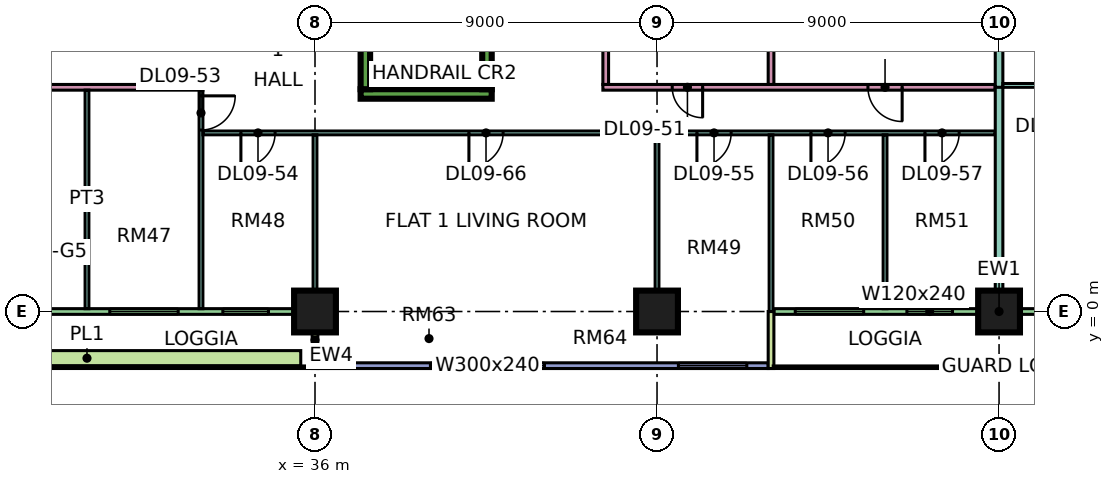
"""IFC4 building model, lengths in metres.
Left out: names, types, materials, properties, quantities, classifications, styles, units other than length and angle.
Written with IfcOpenShell. Run it as: python <this file> out.ifc"""

import sys

from ifc_helpers import new_model, si_unit, direction, frame, frame_2d, origin, origin_2d, place, context, subcontext, project, spatial, rectangle, extrude, element, fill, save


model = new_model("IFC4")
c1 = context("Model", 3, precision=1e-05, world=origin(), true_north=direction((0.0, 1.0)))
c2 = subcontext(c1, "Body", "Model", "MODEL_VIEW")
j1 = project(units=[si_unit("LENGTHUNIT", "METRE"), si_unit("PLANEANGLEUNIT", "RADIAN")], contexts=[c1])
p1 = place(None, origin())
s1 = spatial("IfcSite", under=j1, at=p1, CompositionType="ELEMENT")
p2 = place(p1, origin())
s2 = spatial("IfcBuilding", under=s1, at=p2, CompositionType="ELEMENT")
p3 = place(p2, frame((0.0, 0.0, 48.9)))
s3 = spatial("IfcBuildingStorey", under=s2, at=p3, CompositionType="ELEMENT", Elevation=48.9)
for number, where, z_axis, x_axis in (
    (1, (36.0, 0.0, 0.0), (0.0, 0.0, 1.0), (1.0, 0.0, 0.0)),
    (2, (45.0, 0.0, 0.0), (0.0, 0.0, 1.0), (1.0, 0.0, 0.0)),
    (3, (54.0, 0.0, 0.0), (0.0, 0.0, 1.0), (1.0, 0.0, 0.0)),
):
    element("IfcColumn", number, at=place(p3, frame(where, z_axis=z_axis, x_axis=x_axis)), inside=s3, PredefinedType="COLUMN", context=c2, shape_type="SweptSolid", body=[
        extrude(rectangle(XDim=1.1, YDim=1.1, at=origin_2d()), origin(), (0.0, 0.0, 1.0), 3.75),
    ])
p4 = place(p3, frame((37.2, 5.725, 0.0), z_axis=(0.0, 0.0, 1.0), x_axis=(1.0, 0.0, 0.0)))
e4 = element("IfcWall", 4, at=p4, inside=s3, PredefinedType="SHEAR", context=c2, shape_type="SweptSolid", body=[
    extrude(rectangle(XDim=3.45, YDim=0.25, at=frame_2d((1.725, 0.0))), origin(), (0.0, 0.0, 1.0), 3.75),
])
for number, where, z_axis, x_axis in (
    (5, (37.325, 5.85, 0.0), (0.0, 0.0, 1.0), (0.0, 1.0, 0.0)),
    (6, (40.525, 5.85, 0.0), (0.0, 0.0, 1.0), (0.0, 1.0, 0.0)),
):
    element("IfcWall", number, at=place(p3, frame(where, z_axis=z_axis, x_axis=x_axis)), inside=s3, PredefinedType="SHEAR", context=c2, shape_type="SweptSolid", body=[
        extrude(rectangle(XDim=6.5, YDim=0.25, at=frame_2d((3.25, 0.0))), origin(), (0.0, 0.0, 1.0), 3.75),
    ])
p5 = place(p3, frame((24.075, 0.0, 0.0), z_axis=(0.0, 0.0, 1.0), x_axis=(1.0, 0.0, 0.0)))
e7 = element("IfcWall", 7, at=p5, inside=s3, PredefinedType="SOLIDWALL", context=c2, shape_type="SweptSolid", body=[
    extrude(rectangle(XDim=11.85, YDim=0.15, at=frame_2d((5.925, 0.0))), origin(), (0.0, 0.0, 1.0), 3.35),
])
p6 = place(p5, frame((2.35, 0.0, 0.0)))
e8 = element("IfcOpeningElement", 8, at=p6, cuts=e7, PredefinedType="OPENING", context=c2, shape_type="SweptSolid", body=[
    extrude(rectangle(XDim=1.8, YDim=2.4, at=frame_2d((0.9, 1.2))), frame((0.0, 0.085, 0.0), z_axis=(0.0, -1.0, 0.0), x_axis=(1.0, 0.0, 0.0)), (0.0, 0.0, 1.0), 0.17),
])
p7 = place(p5, frame((6.525, 0.0, 0.45)))
e9 = element("IfcOpeningElement", 9, at=p7, cuts=e7, PredefinedType="OPENING", context=c2, shape_type="SweptSolid", body=[
    extrude(rectangle(XDim=1.8, YDim=2.4, at=frame_2d((0.9, 1.2))), frame((0.0, 0.085, 0.0), z_axis=(0.0, -1.0, 0.0), x_axis=(1.0, 0.0, 0.0)), (0.0, 0.0, 1.0), 0.17),
])
p8 = place(p5, frame((9.5, 0.0, 0.45)))
e10 = element("IfcOpeningElement", 10, at=p8, cuts=e7, PredefinedType="OPENING", context=c2, shape_type="SweptSolid", body=[
    extrude(rectangle(XDim=1.2, YDim=2.4, at=frame_2d((0.6, 1.2))), frame((0.0, 0.085, 0.0), z_axis=(0.0, -1.0, 0.0), x_axis=(1.0, 0.0, 0.0)), (0.0, 0.0, 1.0), 0.17),
])
p9 = place(p3, frame((36.0, -1.5, 0.0), z_axis=(0.0, 0.0, 1.0), x_axis=(0.0, 1.0, 0.0)))
e11 = element("IfcWall", 11, at=p9, inside=s3, PredefinedType="SOLIDWALL", context=c2, shape_type="SweptSolid", body=[
    extrude(rectangle(XDim=1.5, YDim=0.15, at=frame_2d((0.75, 0.0))), origin(), (0.0, 0.0, 1.0), 3.35),
])
p10 = place(p3, frame((36.075, -1.425, 0.0), z_axis=(0.0, 0.0, 1.0), x_axis=(1.0, 0.0, 0.0)))
e12 = element("IfcWall", 12, at=p10, inside=s3, PredefinedType="SOLIDWALL", context=c2, shape_type="SweptSolid", body=[
    extrude(rectangle(XDim=11.85, YDim=0.15, at=frame_2d((5.925, 0.0))), origin(), (0.0, 0.0, 1.0), 3.35),
])
p11 = place(p10, frame((2.962, 0.0, 0.45)))
e13 = element("IfcOpeningElement", 13, at=p11, cuts=e12, PredefinedType="OPENING", context=c2, shape_type="SweptSolid", body=[
    extrude(rectangle(XDim=3.0, YDim=2.4, at=frame_2d((1.5, 1.2))), frame((0.0, 0.085, 0.0), z_axis=(0.0, -1.0, 0.0), x_axis=(1.0, 0.0, 0.0)), (0.0, 0.0, 1.0), 0.17),
])
p12 = place(p10, frame((9.488, 0.0, 0.45)))
e14 = element("IfcOpeningElement", 14, at=p12, cuts=e12, PredefinedType="OPENING", context=c2, shape_type="SweptSolid", body=[
    extrude(rectangle(XDim=1.8, YDim=2.4, at=frame_2d((0.9, 1.2))), frame((0.0, 0.085, 0.0), z_axis=(0.0, -1.0, 0.0), x_axis=(1.0, 0.0, 0.0)), (0.0, 0.0, 1.0), 0.17),
])
p13 = place(p3, frame((48.075, 0.0, 0.0), z_axis=(0.0, 0.0, 1.0), x_axis=(1.0, 0.0, 0.0)))
e15 = element("IfcWall", 15, at=p13, inside=s3, PredefinedType="SOLIDWALL", context=c2, shape_type="SweptSolid", body=[
    extrude(rectangle(XDim=11.85, YDim=0.15, at=frame_2d((5.925, 0.0))), origin(), (0.0, 0.0, 1.0), 3.35),
])
p14 = place(p13, frame((0.562, 0.0, 0.45)))
e16 = element("IfcOpeningElement", 16, at=p14, cuts=e15, PredefinedType="OPENING", context=c2, shape_type="SweptSolid", body=[
    extrude(rectangle(XDim=1.8, YDim=2.4, at=frame_2d((0.9, 1.2))), frame((0.0, 0.085, 0.0), z_axis=(0.0, -1.0, 0.0), x_axis=(1.0, 0.0, 0.0)), (0.0, 0.0, 1.0), 0.17),
])
p15 = place(p13, frame((3.5, 0.0, 0.45)))
e17 = element("IfcOpeningElement", 17, at=p15, cuts=e15, PredefinedType="OPENING", context=c2, shape_type="SweptSolid", body=[
    extrude(rectangle(XDim=1.2, YDim=2.4, at=frame_2d((0.6, 1.2))), frame((0.0, 0.085, 0.0), z_axis=(0.0, -1.0, 0.0), x_axis=(1.0, 0.0, 0.0)), (0.0, 0.0, 1.0), 0.17),
])
p16 = place(p13, frame((7.15, 0.0, 0.45)))
e18 = element("IfcOpeningElement", 18, at=p16, cuts=e15, PredefinedType="OPENING", context=c2, shape_type="SweptSolid", body=[
    extrude(rectangle(XDim=1.2, YDim=2.4, at=frame_2d((0.6, 1.2))), frame((0.0, 0.085, 0.0), z_axis=(0.0, -1.0, 0.0), x_axis=(1.0, 0.0, 0.0)), (0.0, 0.0, 1.0), 0.17),
])
p17 = place(p13, frame((9.488, 0.0, 0.45)))
e19 = element("IfcOpeningElement", 19, at=p17, cuts=e15, PredefinedType="OPENING", context=c2, shape_type="SweptSolid", body=[
    extrude(rectangle(XDim=1.8, YDim=2.4, at=frame_2d((0.9, 1.2))), frame((0.0, 0.085, 0.0), z_axis=(0.0, -1.0, 0.0), x_axis=(1.0, 0.0, 0.0)), (0.0, 0.0, 1.0), 0.17),
])
p18 = place(p3, frame((48.0, -1.5, 0.0), z_axis=(0.0, 0.0, 1.0), x_axis=(0.0, 1.0, 0.0)))
e20 = element("IfcWall", 20, at=p18, inside=s3, PredefinedType="SOLIDWALL", context=c2, shape_type="SweptSolid", body=[
    extrude(rectangle(XDim=1.5, YDim=0.15, at=frame_2d((0.75, 0.0))), origin(), (0.0, 0.0, 1.0), 3.35),
])
p19 = place(p3, frame((24.375, -1.229, 0.0), z_axis=(0.0, 0.0, 1.0), x_axis=(1.0, 0.0, 0.0)))
e21 = element("IfcWall", 21, at=p19, inside=s3, PredefinedType="SOLIDWALL", context=c2, shape_type="SweptSolid", body=[
    extrude(rectangle(XDim=11.25, YDim=0.4, at=frame_2d((5.625, 0.0))), origin(), (0.0, 0.0, 1.0), 0.7),
])
p20 = place(p3, frame((11.925, 5.9, 0.0), z_axis=(0.0, 0.0, 1.0), x_axis=(1.0, 0.0, 0.0)))
e22 = element("IfcWall", 22, at=p20, inside=s3, PredefinedType="PARTITIONING", context=c2, shape_type="SweptSolid", body=[
    extrude(rectangle(XDim=21.125, YDim=0.15, at=frame_2d((10.562, 0.0))), origin(), (0.0, 0.0, 1.0), 3.35),
])
p21 = place(p20, frame((7.125, 0.0, 0.0)))
e23 = element("IfcOpeningElement", 23, at=p21, cuts=e22, PredefinedType="OPENING", context=c2, shape_type="SweptSolid", body=[
    extrude(rectangle(XDim=0.9, YDim=2.1, at=frame_2d((0.45, 1.05))), frame((0.0, 0.085, 0.0), z_axis=(0.0, -1.0, 0.0), x_axis=(1.0, 0.0, 0.0)), (0.0, 0.0, 1.0), 0.17),
])
p22 = place(p20, frame((4.125, 0.0, 0.0)))
e24 = element("IfcOpeningElement", 24, at=p22, cuts=e22, PredefinedType="OPENING", context=c2, shape_type="SweptSolid", body=[
    extrude(rectangle(XDim=0.9, YDim=2.1, at=frame_2d((0.45, 1.05))), frame((0.0, 0.085, 0.0), z_axis=(0.0, -1.0, 0.0), x_axis=(1.0, 0.0, 0.0)), (0.0, 0.0, 1.0), 0.17),
])
p23 = place(p20, frame((13.125, 0.0, 0.0)))
e25 = element("IfcOpeningElement", 25, at=p23, cuts=e22, PredefinedType="OPENING", context=c2, shape_type="SweptSolid", body=[
    extrude(rectangle(XDim=0.9, YDim=2.1, at=frame_2d((0.45, 1.05))), frame((0.0, 0.085, 0.0), z_axis=(0.0, -1.0, 0.0), x_axis=(1.0, 0.0, 0.0)), (0.0, 0.0, 1.0), 0.17),
])
p24 = place(p3, frame((30.0, 0.074, 0.0), z_axis=(0.0, 0.0, 1.0), x_axis=(0.0, 1.0, 0.0)))
e26 = element("IfcWall", 26, at=p24, inside=s3, PredefinedType="PARTITIONING", context=c2, shape_type="SweptSolid", body=[
    extrude(rectangle(XDim=5.751, YDim=0.1, at=frame_2d((2.875, 0.0))), origin(), (0.0, 0.0, 1.0), 3.35),
])
p25 = place(p3, frame((33.0, 0.074, 0.0), z_axis=(0.0, 0.0, 1.0), x_axis=(0.0, 1.0, 0.0)))
e27 = element("IfcWall", 27, at=p25, inside=s3, PredefinedType="PARTITIONING", context=c2, shape_type="SweptSolid", body=[
    extrude(rectangle(XDim=5.751, YDim=0.1, at=frame_2d((2.875, 0.0))), origin(), (0.0, 0.0, 1.0), 3.35),
])
p26 = place(p25, frame((4.701, 0.0, 0.0)))
e28 = element("IfcOpeningElement", 28, at=p26, cuts=e27, PredefinedType="OPENING", context=c2, shape_type="SweptSolid", body=[
    extrude(rectangle(XDim=0.9, YDim=2.1, at=frame_2d((0.45, 1.05))), frame((0.0, 0.06, 0.0), z_axis=(0.0, -1.0, 0.0), x_axis=(1.0, 0.0, 0.0)), (0.0, 0.0, 1.0), 0.12),
])
p27 = place(p3, frame((33.05, 4.7, 0.0), z_axis=(0.0, 0.0, 1.0), x_axis=(1.0, 0.0, 0.0)))
e29 = element("IfcWall", 29, at=p27, inside=s3, PredefinedType="PARTITIONING", context=c2, shape_type="SweptSolid", body=[
    extrude(rectangle(XDim=20.85, YDim=0.1, at=frame_2d((10.425, 0.0))), origin(), (0.0, 0.0, 1.0), 3.35),
])
p28 = place(p27, frame((1.0, 0.0, 0.0)))
e30 = element("IfcOpeningElement", 30, at=p28, cuts=e29, PredefinedType="OPENING", context=c2, shape_type="SweptSolid", body=[
    extrude(rectangle(XDim=0.9, YDim=2.1, at=frame_2d((0.45, 1.05))), frame((0.0, 0.06, 0.0), z_axis=(0.0, -1.0, 0.0), x_axis=(1.0, 0.0, 0.0)), (0.0, 0.0, 1.0), 0.12),
])
p29 = place(p27, frame((13.0, 0.0, 0.0)))
e31 = element("IfcOpeningElement", 31, at=p29, cuts=e29, PredefinedType="OPENING", context=c2, shape_type="SweptSolid", body=[
    extrude(rectangle(XDim=0.9, YDim=2.1, at=frame_2d((0.45, 1.05))), frame((0.0, 0.06, 0.0), z_axis=(0.0, -1.0, 0.0), x_axis=(1.0, 0.0, 0.0)), (0.0, 0.0, 1.0), 0.12),
])
p30 = place(p27, frame((16.0, 0.0, 0.0)))
e32 = element("IfcOpeningElement", 32, at=p30, cuts=e29, PredefinedType="OPENING", context=c2, shape_type="SweptSolid", body=[
    extrude(rectangle(XDim=0.9, YDim=2.1, at=frame_2d((0.45, 1.05))), frame((0.0, 0.06, 0.0), z_axis=(0.0, -1.0, 0.0), x_axis=(1.0, 0.0, 0.0)), (0.0, 0.0, 1.0), 0.12),
])
p31 = place(p27, frame((19.0, 0.0, 0.0)))
e33 = element("IfcOpeningElement", 33, at=p31, cuts=e29, PredefinedType="OPENING", context=c2, shape_type="SweptSolid", body=[
    extrude(rectangle(XDim=0.9, YDim=2.1, at=frame_2d((0.45, 1.05))), frame((0.0, 0.06, 0.0), z_axis=(0.0, -1.0, 0.0), x_axis=(1.0, 0.0, 0.0)), (0.0, 0.0, 1.0), 0.12),
])
p32 = place(p27, frame((7.0, 0.0, 0.0)))
e34 = element("IfcOpeningElement", 34, at=p32, cuts=e29, PredefinedType="OPENING", context=c2, shape_type="SweptSolid", body=[
    extrude(rectangle(XDim=0.9, YDim=2.1, at=frame_2d((0.45, 1.05))), frame((0.0, 0.06, 0.0), z_axis=(0.0, -1.0, 0.0), x_axis=(1.0, 0.0, 0.0)), (0.0, 0.0, 1.0), 0.12),
])
p33 = place(p3, frame((36.0, 0.0, 0.0), z_axis=(0.0, 0.0, 1.0), x_axis=(0.0, 1.0, 0.0)))
e35 = element("IfcWall", 35, at=p33, inside=s3, PredefinedType="PARTITIONING", context=c2, shape_type="SweptSolid", body=[
    extrude(rectangle(XDim=4.65, YDim=0.1, at=frame_2d((2.325, 0.0))), origin(), (0.0, 0.0, 1.0), 3.35),
])
p34 = place(p3, frame((43.575, 5.9, 0.0), z_axis=(0.0, 0.0, 1.0), x_axis=(1.0, 0.0, 0.0)))
e36 = element("IfcWall", 36, at=p34, inside=s3, PredefinedType="PARTITIONING", context=c2, shape_type="SweptSolid", body=[
    extrude(rectangle(XDim=10.325, YDim=0.15, at=frame_2d((5.163, 0.0))), origin(), (0.0, 0.0, 1.0), 3.35),
])
p35 = place(p34, frame((1.825, 0.0, 0.0)))
e37 = element("IfcOpeningElement", 37, at=p35, cuts=e36, PredefinedType="OPENING", context=c2, shape_type="SweptSolid", body=[
    extrude(rectangle(XDim=0.8, YDim=2.1, at=frame_2d((0.4, 1.05))), frame((0.0, 0.085, 0.0), z_axis=(0.0, -1.0, 0.0), x_axis=(1.0, 0.0, 0.0)), (0.0, 0.0, 1.0), 0.17),
])
p36 = place(p34, frame((6.975, 0.0, 0.0)))
e38 = element("IfcOpeningElement", 38, at=p36, cuts=e36, PredefinedType="OPENING", context=c2, shape_type="SweptSolid", body=[
    extrude(rectangle(XDim=0.9, YDim=2.1, at=frame_2d((0.45, 1.05))), frame((0.0, 0.085, 0.0), z_axis=(0.0, -1.0, 0.0), x_axis=(1.0, 0.0, 0.0)), (0.0, 0.0, 1.0), 0.17),
])
p37 = place(p3, frame((43.65, 5.975, 0.0), z_axis=(0.0, 0.0, 1.0), x_axis=(0.0, 1.0, 0.0)))
e39 = element("IfcWall", 39, at=p37, inside=s3, PredefinedType="PARTITIONING", context=c2, shape_type="SweptSolid", body=[
    extrude(rectangle(XDim=6.475, YDim=0.15, at=frame_2d((3.237, 0.0))), origin(), (0.0, 0.0, 1.0), 3.35),
])
p38 = place(p37, frame((4.275, 0.0, 0.0)))
e40 = element("IfcOpeningElement", 40, at=p38, cuts=e39, PredefinedType="OPENING", context=c2, shape_type="SweptSolid", body=[
    extrude(rectangle(XDim=0.9, YDim=2.1, at=frame_2d((0.45, 1.05))), frame((0.0, 0.085, 0.0), z_axis=(0.0, -1.0, 0.0), x_axis=(1.0, 0.0, 0.0)), (0.0, 0.0, 1.0), 0.17),
])
for number, where, z_axis, x_axis in (
    (41, (45.0, 0.0, 0.0), (0.0, 0.0, 1.0), (0.0, 1.0, 0.0)),
    (42, (48.0, 0.0, 0.0), (0.0, 0.0, 1.0), (0.0, 1.0, 0.0)),
):
    element("IfcWall", number, at=place(p3, frame(where, z_axis=z_axis, x_axis=x_axis)), inside=s3, PredefinedType="PARTITIONING", context=c2, shape_type="SweptSolid", body=[
        extrude(rectangle(XDim=4.65, YDim=0.1, at=frame_2d((2.325, 0.0))), origin(), (0.0, 0.0, 1.0), 3.35),
    ])
p39 = place(p3, frame((48.0, 5.975, 0.0), z_axis=(0.0, 0.0, 1.0), x_axis=(0.0, 1.0, 0.0)))
e43 = element("IfcWall", 43, at=p39, inside=s3, PredefinedType="PARTITIONING", context=c2, shape_type="SweptSolid", body=[
    extrude(rectangle(XDim=6.475, YDim=0.15, at=frame_2d((3.237, 0.0))), origin(), (0.0, 0.0, 1.0), 3.35),
])
p40 = place(p3, frame((51.0, 0.074, 0.0), z_axis=(0.0, 0.0, 1.0), x_axis=(0.0, 1.0, 0.0)))
e44 = element("IfcWall", 44, at=p40, inside=s3, PredefinedType="PARTITIONING", context=c2, shape_type="SweptSolid", body=[
    extrude(rectangle(XDim=4.576, YDim=0.1, at=frame_2d((2.288, 0.0))), origin(), (0.0, 0.0, 1.0), 3.35),
])
p41 = place(p3, frame((54.0, 0.074, 0.0), z_axis=(0.0, 0.0, 1.0), x_axis=(0.0, 1.0, 0.0)))
e45 = element("IfcWall", 45, at=p41, inside=s3, PredefinedType="PARTITIONING", context=c2, shape_type="SweptSolid", body=[
    extrude(rectangle(XDim=5.901, YDim=0.2, at=frame_2d((2.951, 0.0))), origin(), (0.0, 0.0, 1.0), 3.35),
])
p42 = place(p3, frame((54.0, 5.9, 0.0), z_axis=(0.0, 0.0, 1.0), x_axis=(0.0, 1.0, 0.0)))
e46 = element("IfcWall", 46, at=p42, inside=s3, PredefinedType="PARTITIONING", context=c2, shape_type="SweptSolid", body=[
    extrude(rectangle(XDim=6.55, YDim=0.2, at=frame_2d((3.275, 0.0))), origin(), (0.0, 0.0, 1.0), 3.35),
])
p43 = place(p3, frame((54.1, 5.95, 0.0), z_axis=(0.0, 0.0, 1.0), x_axis=(1.0, 0.0, 0.0)))
e47 = element("IfcWall", 47, at=p43, inside=s3, PredefinedType="PARTITIONING", context=c2, shape_type="SweptSolid", body=[
    extrude(rectangle(XDim=2.85, YDim=0.1, at=frame_2d((1.425, 0.0))), origin(), (0.0, 0.0, 1.0), 3.35),
])
p44 = place(p43, frame((0.95, 0.0, 0.0)))
e48 = element("IfcOpeningElement", 48, at=p44, cuts=e47, PredefinedType="OPENING", context=c2, shape_type="SweptSolid", body=[
    extrude(rectangle(XDim=0.9, YDim=2.1, at=frame_2d((0.45, 1.05))), frame((0.0, 0.06, 0.0), z_axis=(0.0, -1.0, 0.0), x_axis=(1.0, 0.0, 0.0)), (0.0, 0.0, 1.0), 0.12),
])
p45 = place(p7, origin())
e49 = element("IfcWindow", 49, at=p45, inside=s3, PartitioningType="SINGLE_PANEL", PredefinedType="WINDOW", context=c2, shape_type="SweptSolid", body=[
    extrude(rectangle(XDim=1.8, YDim=2.4, at=frame_2d((0.9, 1.2))), frame((0.0, 0.03, 0.0), z_axis=(0.0, -1.0, 0.0), x_axis=(1.0, 0.0, 0.0)), (0.0, 0.0, 1.0), 0.06),
])
fill(e9, e49)
p46 = place(p8, origin())
e50 = element("IfcWindow", 50, at=p46, inside=s3, PartitioningType="SINGLE_PANEL", PredefinedType="WINDOW", context=c2, shape_type="SweptSolid", body=[
    extrude(rectangle(XDim=1.2, YDim=2.4, at=frame_2d((0.6, 1.2))), frame((0.0, 0.03, 0.0), z_axis=(0.0, -1.0, 0.0), x_axis=(1.0, 0.0, 0.0)), (0.0, 0.0, 1.0), 0.06),
])
fill(e10, e50)
p47 = place(p11, origin())
e51 = element("IfcWindow", 51, at=p47, inside=s3, PartitioningType="SINGLE_PANEL", PredefinedType="WINDOW", context=c2, shape_type="SweptSolid", body=[
    extrude(rectangle(XDim=3.0, YDim=2.4, at=frame_2d((1.5, 1.2))), frame((0.0, 0.03, 0.0), z_axis=(0.0, -1.0, 0.0), x_axis=(1.0, 0.0, 0.0)), (0.0, 0.0, 1.0), 0.06),
])
fill(e13, e51)
p48 = place(p12, origin())
e52 = element("IfcWindow", 52, at=p48, inside=s3, PartitioningType="SINGLE_PANEL", PredefinedType="WINDOW", context=c2, shape_type="SweptSolid", body=[
    extrude(rectangle(XDim=1.8, YDim=2.4, at=frame_2d((0.9, 1.2))), frame((0.0, 0.03, 0.0), z_axis=(0.0, -1.0, 0.0), x_axis=(1.0, 0.0, 0.0)), (0.0, 0.0, 1.0), 0.06),
])
fill(e14, e52)
p49 = place(p14, origin())
e53 = element("IfcWindow", 53, at=p49, inside=s3, PartitioningType="SINGLE_PANEL", PredefinedType="WINDOW", context=c2, shape_type="SweptSolid", body=[
    extrude(rectangle(XDim=1.8, YDim=2.4, at=frame_2d((0.9, 1.2))), frame((0.0, 0.03, 0.0), z_axis=(0.0, -1.0, 0.0), x_axis=(1.0, 0.0, 0.0)), (0.0, 0.0, 1.0), 0.06),
])
fill(e16, e53)
p50 = place(p15, origin())
e54 = element("IfcWindow", 54, at=p50, inside=s3, PartitioningType="SINGLE_PANEL", PredefinedType="WINDOW", context=c2, shape_type="SweptSolid", body=[
    extrude(rectangle(XDim=1.2, YDim=2.4, at=frame_2d((0.6, 1.2))), frame((0.0, 0.03, 0.0), z_axis=(0.0, -1.0, 0.0), x_axis=(1.0, 0.0, 0.0)), (0.0, 0.0, 1.0), 0.06),
])
fill(e17, e54)
p51 = place(p35, origin())
e55 = element("IfcDoor", 55, at=p51, inside=s3, OperationType="SINGLE_SWING_RIGHT", PredefinedType="DOOR", context=c2, shape_type="SweptSolid", body=[
    extrude(rectangle(XDim=0.8, YDim=2.1, at=frame_2d((0.4, 1.05))), frame((0.0, 0.025, 0.0), z_axis=(0.0, -1.0, 0.0), x_axis=(1.0, 0.0, 0.0)), (0.0, 0.0, 1.0), 0.05),
])
fill(e37, e55)
p52 = place(p26, origin())
e56 = element("IfcDoor", 56, at=p52, inside=s3, OperationType="SINGLE_SWING_RIGHT", PredefinedType="DOOR", context=c2, shape_type="SweptSolid", body=[
    extrude(rectangle(XDim=0.9, YDim=2.1, at=frame_2d((0.45, 1.05))), frame((0.0, 0.025, 0.0), z_axis=(0.0, -1.0, 0.0), x_axis=(1.0, 0.0, 0.0)), (0.0, 0.0, 1.0), 0.05),
])
fill(e28, e56)
p53 = place(p28, frame((0.9, 0.0, 0.0), z_axis=(0.0, 0.0, 1.0), x_axis=(-1.0, 0.0, 0.0)))
e57 = element("IfcDoor", 57, at=p53, inside=s3, OperationType="SINGLE_SWING_LEFT", PredefinedType="DOOR", context=c2, shape_type="SweptSolid", body=[
    extrude(rectangle(XDim=0.9, YDim=2.1, at=frame_2d((0.45, 1.05))), frame((0.0, 0.025, 0.0), z_axis=(0.0, -1.0, 0.0), x_axis=(1.0, 0.0, 0.0)), (0.0, 0.0, 1.0), 0.05),
])
fill(e30, e57)
p54 = place(p29, frame((0.9, 0.0, 0.0), z_axis=(0.0, 0.0, 1.0), x_axis=(-1.0, 0.0, 0.0)))
e58 = element("IfcDoor", 58, at=p54, inside=s3, OperationType="SINGLE_SWING_LEFT", PredefinedType="DOOR", context=c2, shape_type="SweptSolid", body=[
    extrude(rectangle(XDim=0.9, YDim=2.1, at=frame_2d((0.45, 1.05))), frame((0.0, 0.025, 0.0), z_axis=(0.0, -1.0, 0.0), x_axis=(1.0, 0.0, 0.0)), (0.0, 0.0, 1.0), 0.05),
])
fill(e31, e58)
p55 = place(p30, frame((0.9, 0.0, 0.0), z_axis=(0.0, 0.0, 1.0), x_axis=(-1.0, 0.0, 0.0)))
e59 = element("IfcDoor", 59, at=p55, inside=s3, OperationType="SINGLE_SWING_LEFT", PredefinedType="DOOR", context=c2, shape_type="SweptSolid", body=[
    extrude(rectangle(XDim=0.9, YDim=2.1, at=frame_2d((0.45, 1.05))), frame((0.0, 0.025, 0.0), z_axis=(0.0, -1.0, 0.0), x_axis=(1.0, 0.0, 0.0)), (0.0, 0.0, 1.0), 0.05),
])
fill(e32, e59)
p56 = place(p31, frame((0.9, 0.0, 0.0), z_axis=(0.0, 0.0, 1.0), x_axis=(-1.0, 0.0, 0.0)))
e60 = element("IfcDoor", 60, at=p56, inside=s3, OperationType="SINGLE_SWING_LEFT", PredefinedType="DOOR", context=c2, shape_type="SweptSolid", body=[
    extrude(rectangle(XDim=0.9, YDim=2.1, at=frame_2d((0.45, 1.05))), frame((0.0, 0.025, 0.0), z_axis=(0.0, -1.0, 0.0), x_axis=(1.0, 0.0, 0.0)), (0.0, 0.0, 1.0), 0.05),
])
fill(e33, e60)
p57 = place(p36, origin())
e61 = element("IfcDoor", 61, at=p57, inside=s3, OperationType="SINGLE_SWING_RIGHT", PredefinedType="DOOR", context=c2, shape_type="SweptSolid", body=[
    extrude(rectangle(XDim=0.9, YDim=2.1, at=frame_2d((0.45, 1.05))), frame((0.0, 0.025, 0.0), z_axis=(0.0, -1.0, 0.0), x_axis=(1.0, 0.0, 0.0)), (0.0, 0.0, 1.0), 0.05),
])
fill(e38, e61)
p58 = place(p32, frame((0.9, 0.0, 0.0), z_axis=(0.0, 0.0, 1.0), x_axis=(-1.0, 0.0, 0.0)))
e62 = element("IfcDoor", 62, at=p58, inside=s3, OperationType="SINGLE_SWING_LEFT", PredefinedType="DOOR", context=c2, shape_type="SweptSolid", body=[
    extrude(rectangle(XDim=0.9, YDim=2.1, at=frame_2d((0.45, 1.05))), frame((0.0, 0.025, 0.0), z_axis=(0.0, -1.0, 0.0), x_axis=(1.0, 0.0, 0.0)), (0.0, 0.0, 1.0), 0.05),
])
fill(e34, e62)
save(model, sys.argv[1])
